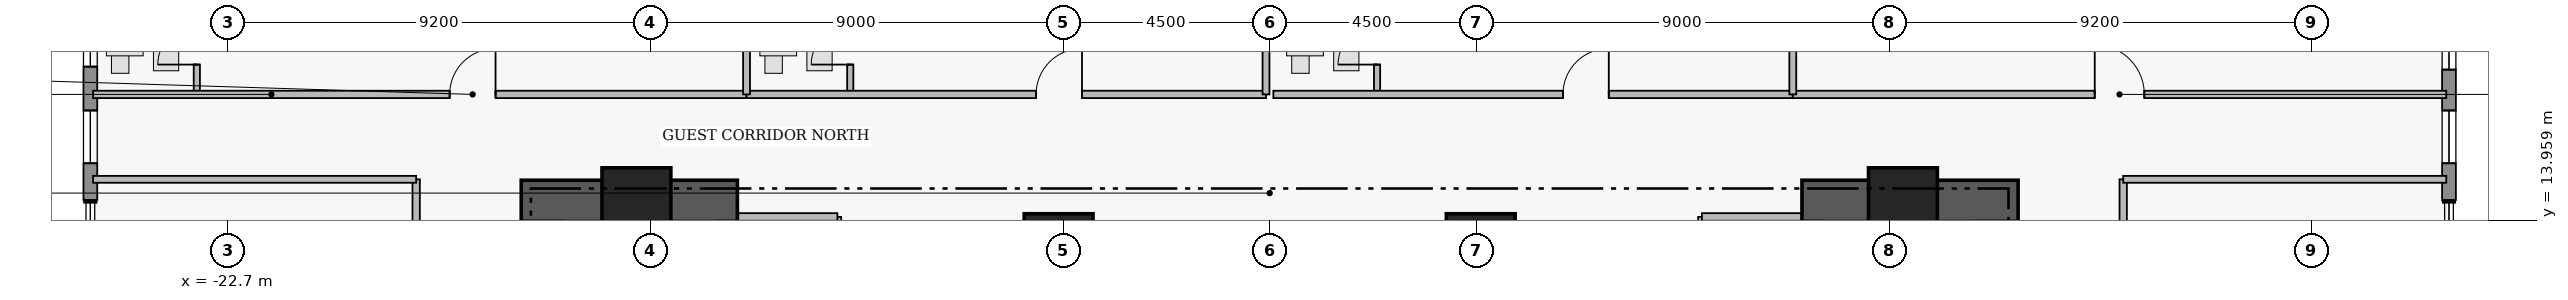
"""IFC4 building model, lengths in metres.
Left out: names, types, materials, properties, quantities, classifications, styles, units other than length and angle.
Written with IfcOpenShell. Run it as: python <this file> out.ifc"""

import sys

from ifc_helpers import new_model, si_unit, direction, frame, frame_2d, origin, origin_2d, place, context, subcontext, project, spatial, rectangle, extrude, element, fill, save


model = new_model("IFC4")
c1 = context("Model", 3, precision=1e-05, world=origin(), true_north=direction((0.0, 1.0)))
c2 = subcontext(c1, "Body", "Model", "MODEL_VIEW")
j1 = project(units=[si_unit("LENGTHUNIT", "METRE"), si_unit("PLANEANGLEUNIT", "RADIAN")], contexts=[c1])
p1 = place(None, origin())
s1 = spatial("IfcSite", under=j1, at=p1, CompositionType="ELEMENT")
p2 = place(p1, origin())
s2 = spatial("IfcBuilding", under=s1, at=p2, CompositionType="ELEMENT")
p3 = place(p2, frame((0.0, 0.0, 71.4)))
s3 = spatial("IfcBuildingStorey", under=s2, at=p3, CompositionType="ELEMENT", Elevation=71.4)
for number, where, z_axis, x_axis in (
    (1, (-16.31, 14.38, 0.0), (0.0, 0.0, 1.0), (1.0, 0.0, 0.0)),
    (2, (11.6, 14.38, 0.0), (0.0, 0.0, 1.0), (1.0, 0.0, 0.0)),
):
    element("IfcWall", number, at=place(p3, frame(where, z_axis=z_axis, x_axis=x_axis)), inside=s3, PredefinedType="SHEAR", context=c2, shape_type="SweptSolid", body=[
        extrude(rectangle(XDim=4.71, YDim=0.9, at=frame_2d((2.355, 0.0))), origin(), (0.0, 0.0, 1.0), 3.46),
    ])
for number, where, z_axis, x_axis in (
    (3, (-13.8, 14.35, 0.0), (0.0, 0.0, 1.0), (1.0, 0.0, 0.0)),
    (4, (-4.6, 13.35, 0.0), (0.0, 0.0, 1.0), (1.0, 0.0, 0.0)),
    (5, (4.6, 13.35, 0.0), (0.0, 0.0, 1.0), (1.0, 0.0, 0.0)),
    (6, (13.8, 14.35, 0.0), (0.0, 0.0, 1.0), (1.0, 0.0, 0.0)),
):
    element("IfcColumn", number, at=place(p3, frame(where, z_axis=z_axis, x_axis=x_axis)), inside=s3, PredefinedType="COLUMN", context=c2, shape_type="SweptSolid", body=[
        extrude(rectangle(XDim=1.5, YDim=1.5, at=origin_2d()), origin(), (0.0, 0.0, 1.0), 3.65),
    ])
p4 = place(p3, frame((-25.7, 14.4, 0.0), z_axis=(0.0, 0.0, 1.0), x_axis=(0.0, 1.0, 0.0)))
e7 = element("IfcWall", 7, at=p4, inside=s3, PredefinedType="STANDARD", context=c2, shape_type="SweptSolid", body=[
    extrude(rectangle(XDim=5.1, YDim=0.3, at=frame_2d((2.55, 0.0))), origin(), (0.0, 0.0, 1.0), 3.43),
])
p5 = place(p4, frame((0.8, 0.0, 0.95)))
e8 = element("IfcOpeningElement", 8, at=p5, cuts=e7, PredefinedType="OPENING", context=c2, shape_type="SweptSolid", body=[
    extrude(rectangle(XDim=1.15, YDim=1.55, at=frame_2d((0.575, 0.775))), frame((0.0, 0.16, 0.0), z_axis=(0.0, -1.0, 0.0), x_axis=(1.0, 0.0, 0.0)), (0.0, 0.0, 1.0), 0.32),
])
p6 = place(p4, frame((2.905, 0.0, 0.95)))
e9 = element("IfcOpeningElement", 9, at=p6, cuts=e7, PredefinedType="OPENING", context=c2, shape_type="SweptSolid", body=[
    extrude(rectangle(XDim=1.15, YDim=1.55, at=frame_2d((0.575, 0.775))), frame((0.0, 0.16, 0.0), z_axis=(0.0, -1.0, 0.0), x_axis=(1.0, 0.0, 0.0)), (0.0, 0.0, 1.0), 0.32),
])
p7 = place(p3, frame((25.7, 19.5, 0.0), z_axis=(0.0, 0.0, 1.0), x_axis=(0.0, -1.0, 0.0)))
e10 = element("IfcWall", 10, at=p7, inside=s3, PredefinedType="STANDARD", context=c2, shape_type="SweptSolid", body=[
    extrude(rectangle(XDim=5.1, YDim=0.3, at=frame_2d((2.55, 0.0))), origin(), (0.0, 0.0, 1.0), 3.43),
])
p8 = place(p7, frame((0.66, 0.0, 0.85)))
e11 = element("IfcOpeningElement", 11, at=p8, cuts=e10, PredefinedType="OPENING", context=c2, shape_type="SweptSolid", body=[
    extrude(rectangle(XDim=1.6, YDim=1.8, at=frame_2d((0.8, 0.9))), frame((0.0, 0.16, 0.0), z_axis=(0.0, -1.0, 0.0), x_axis=(1.0, 0.0, 0.0)), (0.0, 0.0, 1.0), 0.32),
])
p9 = place(p7, frame((3.15, 0.0, 0.95)))
e12 = element("IfcOpeningElement", 12, at=p9, cuts=e10, PredefinedType="OPENING", context=c2, shape_type="SweptSolid", body=[
    extrude(rectangle(XDim=1.15, YDim=1.55, at=frame_2d((0.575, 0.775))), frame((0.0, 0.16, 0.0), z_axis=(0.0, -1.0, 0.0), x_axis=(1.0, 0.0, 0.0)), (0.0, 0.0, 1.0), 0.32),
])
p10 = place(p3, frame((-23.38, 16.7, 0.0), z_axis=(0.0, 0.0, 1.0), x_axis=(0.0, 1.0, 0.0)))
e13 = element("IfcWall", 13, at=p10, inside=s3, PredefinedType="PLUMBINGWALL", context=c2, shape_type="SweptSolid", body=[
    extrude(rectangle(XDim=2.36, YDim=0.135, at=frame_2d((1.18, 0.0))), origin(), (0.0, 0.0, 1.0), 3.43),
])
p11 = place(p10, frame((0.65, 0.0, 0.0)))
e14 = element("IfcOpeningElement", 14, at=p11, cuts=e13, PredefinedType="OPENING", context=c2, shape_type="SweptSolid", body=[
    extrude(rectangle(XDim=0.85, YDim=2.1, at=frame_2d((0.425, 1.05))), frame((0.0, 0.077, 0.0), z_axis=(0.0, -1.0, 0.0), x_axis=(1.0, 0.0, 0.0)), (0.0, 0.0, 1.0), 0.155),
])
p12 = place(p3, frame((-25.64, 16.7, 0.0), z_axis=(0.0, 0.0, 1.0), x_axis=(1.0, 0.0, 0.0)))
e15 = element("IfcWall", 15, at=p12, inside=s3, PredefinedType="PARTITIONING", context=c2, shape_type="SweptSolid", body=[
    extrude(rectangle(XDim=14.24, YDim=0.16, at=frame_2d((7.12, 0.0))), origin(), (0.0, 0.0, 1.0), 2.973),
])
p13 = place(p12, frame((7.77, 0.0, 0.0)))
e16 = element("IfcOpeningElement", 16, at=p13, cuts=e15, PredefinedType="OPENING", context=c2, shape_type="SweptSolid", body=[
    extrude(rectangle(XDim=1.0, YDim=2.15, at=frame_2d((0.5, 1.075))), frame((0.0, 0.09, 0.0), z_axis=(0.0, -1.0, 0.0), x_axis=(1.0, 0.0, 0.0)), (0.0, 0.0, 1.0), 0.18),
])
p14 = place(p3, frame((-9.14, 16.7, 0.0), z_axis=(0.0, 0.0, 1.0), x_axis=(0.0, 1.0, 0.0)))
e17 = element("IfcWall", 17, at=p14, inside=s3, PredefinedType="PLUMBINGWALL", context=c2, shape_type="SweptSolid", body=[
    extrude(rectangle(XDim=2.36, YDim=0.135, at=frame_2d((1.18, 0.0))), origin(), (0.0, 0.0, 1.0), 3.43),
])
p15 = place(p14, frame((0.65, 0.0, 0.0)))
e18 = element("IfcOpeningElement", 18, at=p15, cuts=e17, PredefinedType="OPENING", context=c2, shape_type="SweptSolid", body=[
    extrude(rectangle(XDim=0.85, YDim=2.1, at=frame_2d((0.425, 1.05))), frame((0.0, 0.077, 0.0), z_axis=(0.0, -1.0, 0.0), x_axis=(1.0, 0.0, 0.0)), (0.0, 0.0, 1.0), 0.155),
])
p16 = place(p3, frame((-11.4, 16.7, 0.0), z_axis=(0.0, 0.0, 1.0), x_axis=(1.0, 0.0, 0.0)))
e19 = element("IfcWall", 19, at=p16, inside=s3, PredefinedType="PARTITIONING", context=c2, shape_type="SweptSolid", body=[
    extrude(rectangle(XDim=11.32, YDim=0.16, at=frame_2d((5.66, 0.0))), origin(), (0.0, 0.0, 1.0), 2.973),
])
p17 = place(p16, frame((6.31, 0.0, 0.0)))
e20 = element("IfcOpeningElement", 20, at=p17, cuts=e19, PredefinedType="OPENING", context=c2, shape_type="SweptSolid", body=[
    extrude(rectangle(XDim=1.0, YDim=2.15, at=frame_2d((0.5, 1.075))), frame((0.0, 0.09, 0.0), z_axis=(0.0, -1.0, 0.0), x_axis=(1.0, 0.0, 0.0)), (0.0, 0.0, 1.0), 0.18),
])
p18 = place(p3, frame((2.34, 16.7, 0.0), z_axis=(0.0, 0.0, 1.0), x_axis=(0.0, 1.0, 0.0)))
e21 = element("IfcWall", 21, at=p18, inside=s3, PredefinedType="PLUMBINGWALL", context=c2, shape_type="SweptSolid", body=[
    extrude(rectangle(XDim=2.36, YDim=0.135, at=frame_2d((1.18, 0.0))), origin(), (0.0, 0.0, 1.0), 3.43),
])
p19 = place(p18, frame((0.65, 0.0, 0.0)))
e22 = element("IfcOpeningElement", 22, at=p19, cuts=e21, PredefinedType="OPENING", context=c2, shape_type="SweptSolid", body=[
    extrude(rectangle(XDim=0.85, YDim=2.1, at=frame_2d((0.425, 1.05))), frame((0.0, 0.077, 0.0), z_axis=(0.0, -1.0, 0.0), x_axis=(1.0, 0.0, 0.0)), (0.0, 0.0, 1.0), 0.155),
])
p20 = place(p3, frame((0.08, 16.7, 0.0), z_axis=(0.0, 0.0, 1.0), x_axis=(1.0, 0.0, 0.0)))
e23 = element("IfcWall", 23, at=p20, inside=s3, PredefinedType="PARTITIONING", context=c2, shape_type="SweptSolid", body=[
    extrude(rectangle(XDim=11.32, YDim=0.16, at=frame_2d((5.66, 0.0))), origin(), (0.0, 0.0, 1.0), 2.973),
])
p21 = place(p20, frame((6.31, 0.0, 0.0)))
e24 = element("IfcOpeningElement", 24, at=p21, cuts=e23, PredefinedType="OPENING", context=c2, shape_type="SweptSolid", body=[
    extrude(rectangle(XDim=1.0, YDim=2.15, at=frame_2d((0.5, 1.075))), frame((0.0, 0.09, 0.0), z_axis=(0.0, -1.0, 0.0), x_axis=(1.0, 0.0, 0.0)), (0.0, 0.0, 1.0), 0.18),
])
p22 = place(p3, frame((11.4, 16.7, 0.0), z_axis=(0.0, 0.0, 1.0), x_axis=(1.0, 0.0, 0.0)))
e25 = element("IfcWall", 25, at=p22, inside=s3, PredefinedType="PARTITIONING", context=c2, shape_type="SweptSolid", body=[
    extrude(rectangle(XDim=14.24, YDim=0.16, at=frame_2d((7.12, 0.0))), origin(), (0.0, 0.0, 1.0), 2.973),
])
p23 = place(p22, frame((6.58, 0.0, 0.0)))
e26 = element("IfcOpeningElement", 26, at=p23, cuts=e25, PredefinedType="OPENING", context=c2, shape_type="SweptSolid", body=[
    extrude(rectangle(XDim=1.08, YDim=2.18, at=frame_2d((0.54, 1.09))), frame((0.0, 0.09, 0.0), z_axis=(0.0, -1.0, 0.0), x_axis=(1.0, 0.0, 0.0)), (0.0, 0.0, 1.0), 0.18),
])
p24 = place(p3, frame((18.6, 6.91, 0.0), z_axis=(0.0, 0.0, 1.0), x_axis=(0.0, 1.0, 0.0)))
e27 = element("IfcWall", 27, at=p24, inside=s3, PredefinedType="PARTITIONING", context=c2, shape_type="SweptSolid", body=[
    extrude(rectangle(XDim=7.94, YDim=0.16, at=frame_2d((3.97, 0.0))), origin(), (0.0, 0.0, 1.0), 3.43),
])
p25 = place(p24, frame((3.51, 0.0, 0.0)))
e28 = element("IfcOpeningElement", 28, at=p25, cuts=e27, PredefinedType="OPENING", context=c2, shape_type="SweptSolid", body=[
    extrude(rectangle(XDim=0.92, YDim=2.12, at=frame_2d((0.46, 1.06))), frame((0.0, 0.09, 0.0), z_axis=(0.0, -1.0, 0.0), x_axis=(1.0, 0.0, 0.0)), (0.0, 0.0, 1.0), 0.18),
])
p26 = place(p3, frame((-18.6, 8.06, 0.0), z_axis=(0.0, 0.0, 1.0), x_axis=(0.0, 1.0, 0.0)))
e29 = element("IfcWall", 29, at=p26, inside=s3, PredefinedType="PARTITIONING", context=c2, shape_type="SweptSolid", body=[
    extrude(rectangle(XDim=6.79, YDim=0.16, at=frame_2d((3.395, 0.0))), origin(), (0.0, 0.0, 1.0), 3.43),
])
p27 = place(p26, frame((2.92, 0.0, 0.0)))
e30 = element("IfcOpeningElement", 30, at=p27, cuts=e29, PredefinedType="OPENING", context=c2, shape_type="SweptSolid", body=[
    extrude(rectangle(XDim=0.95, YDim=2.15, at=frame_2d((0.475, 1.075))), frame((0.0, 0.09, 0.0), z_axis=(0.0, -1.0, 0.0), x_axis=(1.0, 0.0, 0.0)), (0.0, 0.0, 1.0), 0.18),
])
p28 = place(p3, frame((-9.42, 11.07, 0.0), z_axis=(0.0, 0.0, 1.0), x_axis=(0.0, 1.0, 0.0)))
e31 = element("IfcWall", 31, at=p28, inside=s3, PredefinedType="PARTITIONING", context=c2, shape_type="SweptSolid", body=[
    extrude(rectangle(XDim=2.96, YDim=0.165, at=frame_2d((1.48, 0.0))), origin(), (0.0, 0.0, 1.0), 3.43),
])
p29 = place(p3, frame((-11.58, 14.03, 0.0), z_axis=(0.0, 0.0, 1.0), x_axis=(1.0, 0.0, 0.0)))
e32 = element("IfcWall", 32, at=p29, inside=s3, PredefinedType="PARTITIONING", context=c2, shape_type="SweptSolid", body=[
    extrude(rectangle(XDim=2.16, YDim=0.165, at=frame_2d((1.08, 0.0))), origin(), (0.0, 0.0, 1.0), 3.43),
])
p30 = place(p3, frame((9.42, 11.07, 0.0), z_axis=(0.0, 0.0, 1.0), x_axis=(0.0, 1.0, 0.0)))
e33 = element("IfcWall", 33, at=p30, inside=s3, PredefinedType="PARTITIONING", context=c2, shape_type="SweptSolid", body=[
    extrude(rectangle(XDim=2.96, YDim=0.165, at=frame_2d((1.48, 0.0))), origin(), (0.0, 0.0, 1.0), 3.43),
])
p31 = place(p3, frame((9.42, 14.03, 0.0), z_axis=(0.0, 0.0, 1.0), x_axis=(1.0, 0.0, 0.0)))
e34 = element("IfcWall", 34, at=p31, inside=s3, PredefinedType="PARTITIONING", context=c2, shape_type="SweptSolid", body=[
    extrude(rectangle(XDim=2.16, YDim=0.165, at=frame_2d((1.08, 0.0))), origin(), (0.0, 0.0, 1.0), 3.43),
])
for number, where, z_axis, x_axis in (
    (35, (-11.4, 16.7, 0.0), (0.0, 0.0, 1.0), (0.0, 1.0, 0.0)),
    (36, (-0.08, 16.7, 0.0), (0.0, 0.0, 1.0), (0.0, 1.0, 0.0)),
    (37, (11.4, 16.7, 0.0), (0.0, 0.0, 1.0), (0.0, 1.0, 0.0)),
):
    element("IfcWall", number, at=place(p3, frame(where, z_axis=z_axis, x_axis=x_axis)), inside=s3, PredefinedType="PARTITIONING", context=c2, shape_type="SweptSolid", body=[
        extrude(rectangle(XDim=6.32, YDim=0.15, at=frame_2d((3.16, 0.0))), origin(), (0.0, 0.0, 1.0), 3.43),
    ])
for number, where, z_axis, x_axis in (
    (38, (18.6, 14.85, 0.0), (0.0, 0.0, 1.0), (1.0, 0.0, 0.0)),
    (39, (-25.64, 14.85, 0.0), (0.0, 0.0, 1.0), (1.0, 0.0, 0.0)),
):
    element("IfcWall", number, at=place(p3, frame(where, z_axis=z_axis, x_axis=x_axis)), inside=s3, PredefinedType="PARTITIONING", context=c2, shape_type="SweptSolid", body=[
        extrude(rectangle(XDim=7.04, YDim=0.15, at=frame_2d((3.52, 0.0))), origin(), (0.0, 0.0, 1.0), 3.43),
    ])
p32 = place(p5, origin())
e40 = element("IfcWindow", 40, at=p32, inside=s3, PartitioningType="SINGLE_PANEL", PredefinedType="WINDOW", context=c2, shape_type="SweptSolid", body=[
    extrude(rectangle(XDim=1.15, YDim=1.55, at=frame_2d((0.575, 0.775))), frame((0.0, 0.03, 0.0), z_axis=(0.0, -1.0, 0.0), x_axis=(1.0, 0.0, 0.0)), (0.0, 0.0, 1.0), 0.06),
])
fill(e8, e40)
p33 = place(p6, origin())
e41 = element("IfcWindow", 41, at=p33, inside=s3, PartitioningType="SINGLE_PANEL", PredefinedType="WINDOW", context=c2, shape_type="SweptSolid", body=[
    extrude(rectangle(XDim=1.15, YDim=1.55, at=frame_2d((0.575, 0.775))), frame((0.0, 0.03, 0.0), z_axis=(0.0, -1.0, 0.0), x_axis=(1.0, 0.0, 0.0)), (0.0, 0.0, 1.0), 0.06),
])
fill(e9, e41)
p34 = place(p8, origin())
e42 = element("IfcWindow", 42, at=p34, inside=s3, PartitioningType="SINGLE_PANEL", PredefinedType="WINDOW", context=c2, shape_type="SweptSolid", body=[
    extrude(rectangle(XDim=1.6, YDim=1.8, at=frame_2d((0.8, 0.9))), frame((0.0, 0.03, 0.0), z_axis=(0.0, -1.0, 0.0), x_axis=(1.0, 0.0, 0.0)), (0.0, 0.0, 1.0), 0.06),
])
fill(e11, e42)
p35 = place(p9, origin())
e43 = element("IfcWindow", 43, at=p35, inside=s3, PartitioningType="SINGLE_PANEL", PredefinedType="WINDOW", context=c2, shape_type="SweptSolid", body=[
    extrude(rectangle(XDim=1.15, YDim=1.55, at=frame_2d((0.575, 0.775))), frame((0.0, 0.03, 0.0), z_axis=(0.0, -1.0, 0.0), x_axis=(1.0, 0.0, 0.0)), (0.0, 0.0, 1.0), 0.06),
])
fill(e12, e43)
p36 = place(p11, origin())
e44 = element("IfcDoor", 44, at=p36, inside=s3, OperationType="SINGLE_SWING_LEFT", PredefinedType="DOOR", context=c2, shape_type="SweptSolid", body=[
    extrude(rectangle(XDim=0.85, YDim=2.1, at=frame_2d((0.425, 1.05))), frame((0.0, 0.025, 0.0), z_axis=(0.0, -1.0, 0.0), x_axis=(1.0, 0.0, 0.0)), (0.0, 0.0, 1.0), 0.05),
])
fill(e14, e44)
p37 = place(p13, origin())
e45 = element("IfcDoor", 45, at=p37, inside=s3, OperationType="SINGLE_SWING_RIGHT", PredefinedType="DOOR", context=c2, shape_type="SweptSolid", body=[
    extrude(rectangle(XDim=1.0, YDim=2.15, at=frame_2d((0.5, 1.075))), frame((0.0, 0.025, 0.0), z_axis=(0.0, -1.0, 0.0), x_axis=(1.0, 0.0, 0.0)), (0.0, 0.0, 1.0), 0.05),
])
fill(e16, e45)
p38 = place(p15, origin())
e46 = element("IfcDoor", 46, at=p38, inside=s3, OperationType="SINGLE_SWING_LEFT", PredefinedType="DOOR", context=c2, shape_type="SweptSolid", body=[
    extrude(rectangle(XDim=0.85, YDim=2.1, at=frame_2d((0.425, 1.05))), frame((0.0, 0.025, 0.0), z_axis=(0.0, -1.0, 0.0), x_axis=(1.0, 0.0, 0.0)), (0.0, 0.0, 1.0), 0.05),
])
fill(e18, e46)
p39 = place(p17, origin())
e47 = element("IfcDoor", 47, at=p39, inside=s3, OperationType="SINGLE_SWING_RIGHT", PredefinedType="DOOR", context=c2, shape_type="SweptSolid", body=[
    extrude(rectangle(XDim=1.0, YDim=2.15, at=frame_2d((0.5, 1.075))), frame((0.0, 0.025, 0.0), z_axis=(0.0, -1.0, 0.0), x_axis=(1.0, 0.0, 0.0)), (0.0, 0.0, 1.0), 0.05),
])
fill(e20, e47)
p40 = place(p19, origin())
e48 = element("IfcDoor", 48, at=p40, inside=s3, OperationType="SINGLE_SWING_LEFT", PredefinedType="DOOR", context=c2, shape_type="SweptSolid", body=[
    extrude(rectangle(XDim=0.85, YDim=2.1, at=frame_2d((0.425, 1.05))), frame((0.0, 0.025, 0.0), z_axis=(0.0, -1.0, 0.0), x_axis=(1.0, 0.0, 0.0)), (0.0, 0.0, 1.0), 0.05),
])
fill(e22, e48)
p41 = place(p21, origin())
e49 = element("IfcDoor", 49, at=p41, inside=s3, OperationType="SINGLE_SWING_RIGHT", PredefinedType="DOOR", context=c2, shape_type="SweptSolid", body=[
    extrude(rectangle(XDim=1.0, YDim=2.15, at=frame_2d((0.5, 1.075))), frame((0.0, 0.025, 0.0), z_axis=(0.0, -1.0, 0.0), x_axis=(1.0, 0.0, 0.0)), (0.0, 0.0, 1.0), 0.05),
])
fill(e24, e49)
p42 = place(p23, origin())
e50 = element("IfcDoor", 50, at=p42, inside=s3, OperationType="SINGLE_SWING_LEFT", PredefinedType="DOOR", context=c2, shape_type="SweptSolid", body=[
    extrude(rectangle(XDim=1.08, YDim=2.18, at=frame_2d((0.54, 1.09))), frame((0.0, 0.025, 0.0), z_axis=(0.0, -1.0, 0.0), x_axis=(1.0, 0.0, 0.0)), (0.0, 0.0, 1.0), 0.05),
])
fill(e26, e50)
save(model, sys.argv[1])
